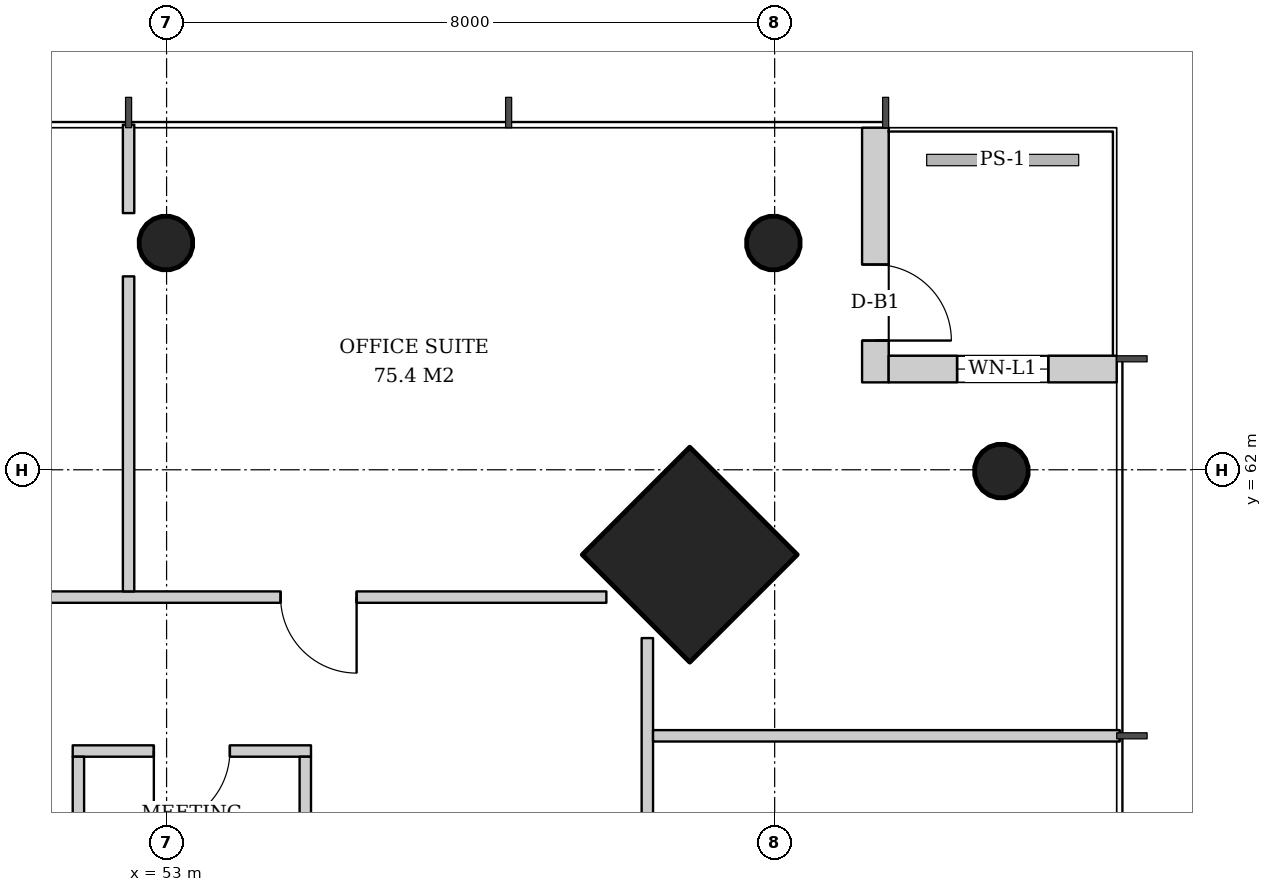
"""IFC4 building model, lengths in metres.
Left out: names, types, materials, properties, quantities, classifications, styles, units other than length and angle.
Written with IfcOpenShell. Run it as: python <this file> out.ifc"""

import sys

from ifc_helpers import new_model, si_unit, direction, frame, frame_2d, origin, origin_2d, place, context, subcontext, project, spatial, rectangle, hollow_circle, extrude, element, fill, save


model = new_model("IFC4")
c1 = context("Model", 3, precision=1e-05, world=origin(), true_north=direction((0.0, 1.0)))
c2 = subcontext(c1, "Body", "Model", "MODEL_VIEW")
j1 = project(units=[si_unit("LENGTHUNIT", "METRE"), si_unit("PLANEANGLEUNIT", "RADIAN")], contexts=[c1])
p1 = place(None, origin())
s1 = spatial("IfcSite", under=j1, at=p1, CompositionType="ELEMENT")
p2 = place(p1, origin())
s2 = spatial("IfcBuilding", under=s1, at=p2, CompositionType="ELEMENT")
p3 = place(p2, frame((0.0, 0.0, 176.8)))
s3 = spatial("IfcBuildingStorey", under=s2, at=p3, CompositionType="ELEMENT", Elevation=176.8)
p4 = place(p3, frame((59.921, 60.921, 0.0), z_axis=(-0.031898107953, -0.031898107953, 0.998981992539), x_axis=(0.707106781187, -0.707106781187, 0.0)))
e1 = element("IfcColumn", 1, at=p4, inside=s3, PredefinedType="COLUMN", context=c2, shape_type="SweptSolid", body=[
    extrude(rectangle(XDim=2.0, YDim=2.0, at=origin_2d()), origin(), (0.0, 0.0, 1.0), 3.804),
])
for number, where, z_axis, x_axis in (
    (2, (64.021, 62.021, 0.0), (-0.032, -0.032, 0.999), (0.707, -0.707, 0.0)),
    (3, (61.021, 65.021, 0.0), (-0.032, -0.032, 0.999), (0.707, -0.707, 0.0)),
):
    element("IfcColumn", number, at=place(p3, frame(where, z_axis=z_axis, x_axis=x_axis)), inside=s3, PredefinedType="COLUMN", context=c2, shape_type="SweptSolid", body=[
        extrude(hollow_circle(Radius=0.355, WallThickness=0.025, at=origin_2d()), origin(), (0.0, 0.0, 1.0), 3.804),
    ])
p5 = place(p3, frame((53.011, 65.021, 0.0), z_axis=(-0.015987204877, -0.031974409754, 0.999360818924), x_axis=(0.894427191, -0.4472135955, 0.0)))
e4 = element("IfcColumn", 4, at=p5, inside=s3, PredefinedType="COLUMN", context=c2, shape_type="SweptSolid", body=[
    extrude(hollow_circle(Radius=0.355, WallThickness=0.025, at=origin_2d()), origin(), (0.0, 0.0, 1.0), 3.802),
])
p6 = place(p3, frame((62.325, 66.5, 0.0), z_axis=(0.0, 0.0, 1.0), x_axis=(0.0, -1.0, 0.0)))
e5 = element("IfcWall", 5, at=p6, inside=s3, PredefinedType="SOLIDWALL", context=c2, shape_type="SweptSolid", body=[
    extrude(rectangle(XDim=3.35, YDim=0.35, at=frame_2d((1.675, 0.0))), origin(), (0.0, 0.0, 1.0), 3.62),
])
p7 = place(p6, frame((1.8, 0.0, 0.0)))
e6 = element("IfcOpeningElement", 6, at=p7, cuts=e5, PredefinedType="OPENING", context=c2, shape_type="SweptSolid", body=[
    extrude(rectangle(XDim=1.0, YDim=2.4, at=frame_2d((0.5, 1.2))), frame((0.0, 0.185, 0.0), z_axis=(0.0, -1.0, 0.0), x_axis=(1.0, 0.0, 0.0)), (0.0, 0.0, 1.0), 0.37),
])
p8 = place(p3, frame((62.5, 63.325, 0.0), z_axis=(0.0, 0.0, 1.0), x_axis=(1.0, 0.0, 0.0)))
e7 = element("IfcWall", 7, at=p8, inside=s3, PredefinedType="SOLIDWALL", context=c2, shape_type="SweptSolid", body=[
    extrude(rectangle(XDim=3.0, YDim=0.35, at=frame_2d((1.5, 0.0))), origin(), (0.0, 0.0, 1.0), 3.62),
])
p9 = place(p8, frame((0.9, 0.0, 0.6)))
e8 = element("IfcOpeningElement", 8, at=p9, cuts=e7, PredefinedType="OPENING", context=c2, shape_type="SweptSolid", body=[
    extrude(rectangle(XDim=1.2, YDim=2.55, at=frame_2d((0.6, 1.275))), frame((0.0, 0.185, 0.0), z_axis=(0.0, -1.0, 0.0), x_axis=(1.0, 0.0, 0.0)), (0.0, 0.0, 1.0), 0.37),
])
p10 = place(p3, frame((54.9, 58.3, 0.0), z_axis=(0.0, 0.0, 1.0), x_axis=(-1.0, 0.0, 0.0)))
e9 = element("IfcWall", 9, at=p10, inside=s3, PredefinedType="PARTITIONING", context=c2, shape_type="SweptSolid", body=[
    extrude(rectangle(XDim=3.135, YDim=0.15, at=frame_2d((1.567, 0.0))), origin(), (0.0, 0.0, 1.0), 2.92),
])
p11 = place(p10, frame((1.067, 0.0, 0.0)))
e10 = element("IfcOpeningElement", 10, at=p11, cuts=e9, PredefinedType="OPENING", context=c2, shape_type="SweptSolid", body=[
    extrude(rectangle(XDim=1.0, YDim=2.1, at=frame_2d((0.5, 1.05))), frame((0.0, 0.085, 0.0), z_axis=(0.0, -1.0, 0.0), x_axis=(1.0, 0.0, 0.0)), (0.0, 0.0, 1.0), 0.17),
])
p12 = place(p3, frame((54.825, 55.9, 0.0), z_axis=(0.0, 0.0, 1.0), x_axis=(0.0, 1.0, 0.0)))
e11 = element("IfcWall", 11, at=p12, inside=s3, PredefinedType="PARTITIONING", context=c2, shape_type="SweptSolid", body=[
    extrude(rectangle(XDim=2.325, YDim=0.15, at=frame_2d((1.163, 0.0))), origin(), (0.0, 0.0, 1.0), 2.867),
])
p13 = place(p3, frame((51.84, 55.9, 0.0), z_axis=(0.0, 0.0, 1.0), x_axis=(0.0, 1.0, 0.0)))
e12 = element("IfcWall", 12, at=p13, inside=s3, PredefinedType="PARTITIONING", context=c2, shape_type="SweptSolid", body=[
    extrude(rectangle(XDim=2.325, YDim=0.15, at=frame_2d((1.163, 0.0))), origin(), (0.0, 0.0, 1.0), 3.62),
])
p14 = place(p3, frame((59.325, 32.214, 0.0), z_axis=(0.0, 0.0, 1.0), x_axis=(0.0, 1.0, 0.0)))
e13 = element("IfcWall", 13, at=p14, inside=s3, PredefinedType="PARTITIONING", context=c2, shape_type="SweptSolid", body=[
    extrude(rectangle(XDim=27.572, YDim=0.15, at=frame_2d((13.786, 0.0))), origin(), (0.0, 0.0, 1.0), 2.867),
])
p15 = place(p14, frame((2.886, 0.0, 0.0)))
e14 = element("IfcOpeningElement", 14, at=p15, cuts=e13, PredefinedType="OPENING", context=c2, shape_type="SweptSolid", body=[
    extrude(rectangle(XDim=1.8, YDim=2.4, at=frame_2d((0.9, 1.2))), frame((0.0, 0.085, 0.0), z_axis=(0.0, -1.0, 0.0), x_axis=(1.0, 0.0, 0.0)), (0.0, 0.0, 1.0), 0.17),
])
p16 = place(p3, frame((59.4, 58.5, 0.0), z_axis=(0.0, 0.0, 1.0), x_axis=(1.0, 0.0, 0.0)))
e15 = element("IfcWall", 15, at=p16, inside=s3, PredefinedType="PARTITIONING", context=c2, shape_type="SweptSolid", body=[
    extrude(rectangle(XDim=6.14, YDim=0.15, at=frame_2d((3.07, 0.0))), origin(), (0.0, 0.0, 1.0), 3.12),
])
p17 = place(p3, frame((58.786, 60.325, 0.0), z_axis=(0.0, 0.0, 1.0), x_axis=(-1.0, 0.0, 0.0)))
e16 = element("IfcWall", 16, at=p17, inside=s3, PredefinedType="PARTITIONING", context=c2, shape_type="SweptSolid", body=[
    extrude(rectangle(XDim=27.572, YDim=0.15, at=frame_2d((13.786, 0.0))), origin(), (0.0, 0.0, 1.0), 2.867),
])
p18 = place(p17, frame((3.286, 0.0, 0.0)))
e17 = element("IfcOpeningElement", 17, at=p18, cuts=e16, PredefinedType="OPENING", context=c2, shape_type="SweptSolid", body=[
    extrude(rectangle(XDim=1.0, YDim=2.1, at=frame_2d((0.5, 1.05))), frame((0.0, 0.085, 0.0), z_axis=(0.0, -1.0, 0.0), x_axis=(1.0, 0.0, 0.0)), (0.0, 0.0, 1.0), 0.17),
])
p19 = place(p17, frame((8.286, 0.0, 0.0)))
e18 = element("IfcOpeningElement", 18, at=p19, cuts=e16, PredefinedType="OPENING", context=c2, shape_type="SweptSolid", body=[
    extrude(rectangle(XDim=1.0, YDim=2.1, at=frame_2d((0.5, 1.05))), frame((0.0, 0.085, 0.0), z_axis=(0.0, -1.0, 0.0), x_axis=(1.0, 0.0, 0.0)), (0.0, 0.0, 1.0), 0.17),
])
p20 = place(p17, frame((13.286, 0.0, 0.0)))
e19 = element("IfcOpeningElement", 19, at=p20, cuts=e16, PredefinedType="OPENING", context=c2, shape_type="SweptSolid", body=[
    extrude(rectangle(XDim=1.0, YDim=2.1, at=frame_2d((0.5, 1.05))), frame((0.0, 0.085, 0.0), z_axis=(0.0, -1.0, 0.0), x_axis=(1.0, 0.0, 0.0)), (0.0, 0.0, 1.0), 0.17),
])
p21 = place(p17, frame((18.286, 0.0, 0.0)))
e20 = element("IfcOpeningElement", 20, at=p21, cuts=e16, PredefinedType="OPENING", context=c2, shape_type="SweptSolid", body=[
    extrude(rectangle(XDim=1.0, YDim=2.1, at=frame_2d((0.5, 1.05))), frame((0.0, 0.085, 0.0), z_axis=(0.0, -1.0, 0.0), x_axis=(1.0, 0.0, 0.0)), (0.0, 0.0, 1.0), 0.17),
])
p22 = place(p17, frame((23.286, 0.0, 0.0)))
e21 = element("IfcOpeningElement", 21, at=p22, cuts=e16, PredefinedType="OPENING", context=c2, shape_type="SweptSolid", body=[
    extrude(rectangle(XDim=1.0, YDim=2.1, at=frame_2d((0.5, 1.05))), frame((0.0, 0.085, 0.0), z_axis=(0.0, -1.0, 0.0), x_axis=(1.0, 0.0, 0.0)), (0.0, 0.0, 1.0), 0.17),
])
p23 = place(p3, frame((52.5, 60.4, 0.0), z_axis=(0.0, 0.0, 1.0), x_axis=(0.0, 1.0, 0.0)))
e22 = element("IfcWall", 22, at=p23, inside=s3, PredefinedType="PARTITIONING", context=c2, shape_type="SweptSolid", body=[
    extrude(rectangle(XDim=4.145, YDim=0.15, at=frame_2d((2.072, 0.0))), origin(), (0.0, 0.0, 1.0), 3.62),
])
p24 = place(p3, frame((52.5, 65.377, 0.0), z_axis=(0.0, 0.0, 1.0), x_axis=(0.0, 1.0, 0.0)))
e23 = element("IfcWall", 23, at=p24, inside=s3, PredefinedType="PARTITIONING", context=c2, shape_type="SweptSolid", body=[
    extrude(rectangle(XDim=1.163, YDim=0.15, at=frame_2d((0.582, 0.0))), origin(), (0.0, 0.0, 1.0), 3.62),
])
p25 = place(p7, origin())
e24 = element("IfcDoor", 24, at=p25, inside=s3, OperationType="SINGLE_SWING_RIGHT", PredefinedType="DOOR", context=c2, shape_type="SweptSolid", body=[
    extrude(rectangle(XDim=1.0, YDim=2.4, at=frame_2d((0.5, 1.2))), frame((0.0, 0.025, 0.0), z_axis=(0.0, -1.0, 0.0), x_axis=(1.0, 0.0, 0.0)), (0.0, 0.0, 1.0), 0.05),
])
fill(e6, e24)
p26 = place(p9, origin())
e25 = element("IfcWindow", 25, at=p26, inside=s3, PartitioningType="SINGLE_PANEL", PredefinedType="WINDOW", context=c2, shape_type="SweptSolid", body=[
    extrude(rectangle(XDim=1.2, YDim=2.55, at=frame_2d((0.6, 1.275))), frame((0.0, 0.03, 0.0), z_axis=(0.0, -1.0, 0.0), x_axis=(1.0, 0.0, 0.0)), (0.0, 0.0, 1.0), 0.06),
])
fill(e8, e25)
p27 = place(p11, origin())
e26 = element("IfcDoor", 26, at=p27, inside=s3, OperationType="SINGLE_SWING_RIGHT", PredefinedType="DOOR", context=c2, shape_type="SweptSolid", body=[
    extrude(rectangle(XDim=1.0, YDim=2.1, at=frame_2d((0.5, 1.05))), frame((0.0, 0.025, 0.0), z_axis=(0.0, -1.0, 0.0), x_axis=(1.0, 0.0, 0.0)), (0.0, 0.0, 1.0), 0.05),
])
fill(e10, e26)
p28 = place(p18, origin())
e27 = element("IfcDoor", 27, at=p28, inside=s3, OperationType="SINGLE_SWING_LEFT", PredefinedType="DOOR", context=c2, shape_type="SweptSolid", body=[
    extrude(rectangle(XDim=1.0, YDim=2.1, at=frame_2d((0.5, 1.05))), frame((0.0, 0.025, 0.0), z_axis=(0.0, -1.0, 0.0), x_axis=(1.0, 0.0, 0.0)), (0.0, 0.0, 1.0), 0.05),
])
fill(e17, e27)
save(model, sys.argv[1])
